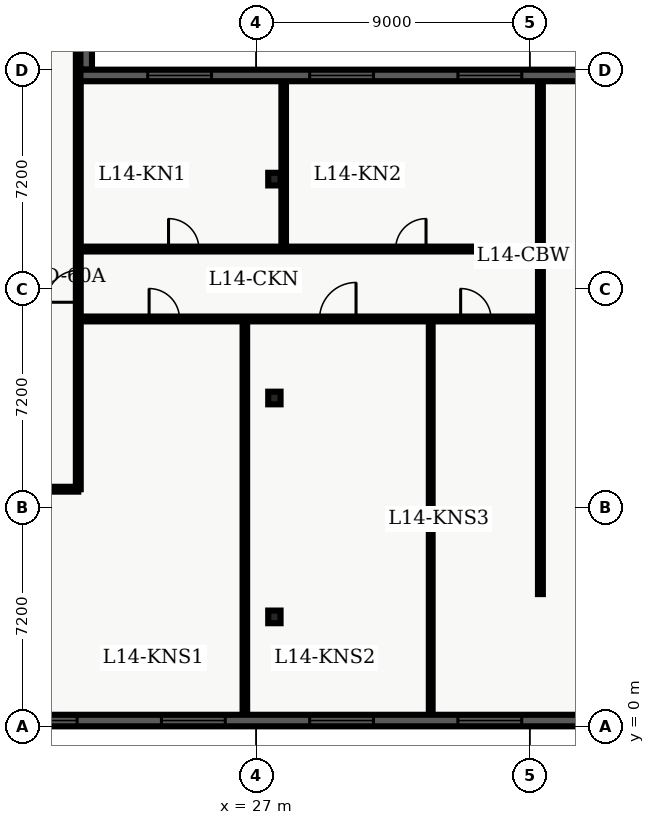
"""IFC4 building model, lengths in metres.
Left out: names, types, materials, properties, quantities, classifications, styles, units other than length and angle.
Written with IfcOpenShell. Run it as: python <this file> out.ifc"""

import sys

from ifc_helpers import new_model, entity, si_unit, converted_unit, direction, frame, origin_with_axes, origin_2d_with_axis, place, context, subcontext, project, spatial, polyline, rectangle, i_section, outline, extrude, element, fill, save


model = new_model("IFC4")
c1 = context("Model", 3, precision=1e-05, world=origin_with_axes(), true_north=direction((0.0, 1.0)))
c2 = subcontext(c1, "Body", "Model", "MODEL_VIEW")
j1 = project(units=[si_unit("LENGTHUNIT", "METRE"), converted_unit("PLANEANGLEUNIT", "DEGREE", entity("IfcPlaneAngleMeasure", 0.017), si_unit("PLANEANGLEUNIT", "RADIAN"), dimensions=[0, 0, 0, 0, 0, 0, 0])], contexts=[c1])
p1 = place(None, origin_with_axes())
s1 = spatial("IfcSite", under=j1, at=p1, CompositionType="ELEMENT")
p2 = place(p1, origin_with_axes())
s2 = spatial("IfcBuilding", under=s1, at=p2, CompositionType="ELEMENT")
p3 = place(p2, frame((0.0, 0.0, 60.0), z_axis=(0.0, 0.0, 1.0), x_axis=(1.0, 0.0, 0.0)))
s3 = spatial("IfcBuildingStorey", under=s2, at=p3, CompositionType="ELEMENT", Elevation=60.0)
for number, where, z_axis, x_axis in (
    (1, (27.6, 3.6, 0.0), (0.0, 0.0, 1.0), (1.0, 0.0, 0.0)),
    (2, (27.6, 10.8, 0.0), (0.0, 0.0, 1.0), (1.0, 0.0, 0.0)),
    (3, (27.6, 18.0, 0.0), (0.0, 0.0, 1.0), (1.0, 0.0, 0.0)),
):
    element("IfcColumn", number, at=place(p3, frame(where, z_axis=z_axis, x_axis=x_axis)), inside=s3, PredefinedType="COLUMN", context=c2, shape_type="SweptSolid", body=[
        extrude(i_section(OverallWidth=0.406, OverallDepth=0.416, WebThickness=0.03, FlangeThickness=0.048, FilletRadius=0.022, at=origin_2d_with_axis()), origin_with_axes(), (0.0, 0.0, 1.0), 3.9),
    ])
p4 = place(p3, frame((2.6, 7.8, 0.0), z_axis=(0.0, 0.0, 1.0), x_axis=(1.0, 0.0, 0.0)))
e4 = element("IfcWall", 4, at=p4, inside=s3, PredefinedType="PARTITIONING", context=c2, shape_type="SweptSolid", body=[
    extrude(outline(polyline([(0.0, -0.08), (18.55, -0.08), (18.55, 0.08), (0.0, 0.08), (0.0, -0.08)])), origin_with_axes(), (0.0, 0.0, 1.0), 2.7),
])
p5 = place(p4, frame((6.426, 0.0, 0.0), z_axis=(0.0, 0.0, 1.0), x_axis=(1.0, 0.0, 0.0)))
e5 = element("IfcOpeningElement", 5, at=p5, cuts=e4, PredefinedType="OPENING", context=c2, shape_type="SweptSolid", body=[
    extrude(rectangle(XDim=1.2, YDim=0.18, at=origin_2d_with_axis()), origin_with_axes(), (0.0, 0.0, 1.0), 2.2),
])
p6 = place(p4, frame((15.681, 0.0, 0.0), z_axis=(0.0, 0.0, 1.0), x_axis=(1.0, 0.0, 0.0)))
e6 = element("IfcOpeningElement", 6, at=p6, cuts=e4, PredefinedType="OPENING", context=c2, shape_type="SweptSolid", body=[
    extrude(rectangle(XDim=1.0, YDim=0.18, at=origin_2d_with_axis()), origin_with_axes(), (0.0, 0.0, 1.0), 2.15),
])
p7 = place(p3, frame((21.15, 7.8, 0.0), z_axis=(0.0, 0.0, 1.0), x_axis=(0.0, 1.0, 0.0)))
e7 = element("IfcWall", 7, at=p7, inside=s3, PredefinedType="PARTITIONING", context=c2, shape_type="SweptSolid", body=[
    extrude(outline(polyline([(0.0, -0.08), (32.7, -0.08), (32.7, 0.08), (0.0, 0.08), (0.0, -0.08)])), origin_with_axes(), (0.0, 0.0, 1.0), 2.7),
])
p8 = place(p7, frame((6.675, 0.0, 0.0), z_axis=(0.0, 0.0, 1.0), x_axis=(1.0, 0.0, 0.0)))
e8 = element("IfcOpeningElement", 8, at=p8, cuts=e7, PredefinedType="OPENING", context=c2, shape_type="SweptSolid", body=[
    extrude(rectangle(XDim=1.05, YDim=0.18, at=origin_2d_with_axis()), origin_with_axes(), (0.0, 0.0, 1.0), 2.15),
])
p9 = place(p3, frame((21.15, 13.4, 0.0), z_axis=(0.0, 0.0, 1.0), x_axis=(1.0, 0.0, 0.0)))
e9 = element("IfcWall", 9, at=p9, inside=s3, PredefinedType="PARTITIONING", context=c2, shape_type="SweptSolid", body=[
    extrude(outline(polyline([(0.0, -0.08), (15.2, -0.08), (15.2, 0.08), (0.0, 0.08), (0.0, -0.08)])), origin_with_axes(), (0.0, 0.0, 1.0), 2.7),
])
p10 = place(p9, frame((2.829, 0.0, 0.0), z_axis=(0.0, 0.0, 1.0), x_axis=(1.0, 0.0, 0.0)))
e10 = element("IfcOpeningElement", 10, at=p10, cuts=e9, PredefinedType="OPENING", context=c2, shape_type="SweptSolid", body=[
    extrude(rectangle(XDim=1.0, YDim=0.18, at=origin_2d_with_axis()), origin_with_axes(), (0.0, 0.0, 1.0), 2.15),
])
p11 = place(p9, frame((8.536, 0.0, 0.0), z_axis=(0.0, 0.0, 1.0), x_axis=(1.0, 0.0, 0.0)))
e11 = element("IfcOpeningElement", 11, at=p11, cuts=e9, PredefinedType="OPENING", context=c2, shape_type="SweptSolid", body=[
    extrude(rectangle(XDim=1.2, YDim=0.18, at=origin_2d_with_axis()), origin_with_axes(), (0.0, 0.0, 1.0), 2.2),
])
p12 = place(p9, frame((13.076, 0.0, 0.0), z_axis=(0.0, 0.0, 1.0), x_axis=(1.0, 0.0, 0.0)))
e12 = element("IfcOpeningElement", 12, at=p12, cuts=e9, PredefinedType="OPENING", context=c2, shape_type="SweptSolid", body=[
    extrude(rectangle(XDim=1.0, YDim=0.18, at=origin_2d_with_axis()), origin_with_axes(), (0.0, 0.0, 1.0), 2.15),
])
p13 = place(p3, frame((21.15, 15.7, 0.0), z_axis=(0.0, 0.0, 1.0), x_axis=(1.0, 0.0, 0.0)))
e13 = element("IfcWall", 13, at=p13, inside=s3, PredefinedType="PARTITIONING", context=c2, shape_type="SweptSolid", body=[
    extrude(outline(polyline([(0.0, -0.08), (15.2, -0.08), (15.2, 0.08), (0.0, 0.08), (0.0, -0.08)])), origin_with_axes(), (0.0, 0.0, 1.0), 2.7),
])
p14 = place(p13, frame((3.468, 0.0, 0.0), z_axis=(0.0, 0.0, 1.0), x_axis=(1.0, 0.0, 0.0)))
e14 = element("IfcOpeningElement", 14, at=p14, cuts=e13, PredefinedType="OPENING", context=c2, shape_type="SweptSolid", body=[
    extrude(rectangle(XDim=1.0, YDim=0.18, at=origin_2d_with_axis()), origin_with_axes(), (0.0, 0.0, 1.0), 2.15),
])
p15 = place(p13, frame((10.938, 0.0, 0.0), z_axis=(0.0, 0.0, 1.0), x_axis=(1.0, 0.0, 0.0)))
e15 = element("IfcOpeningElement", 15, at=p15, cuts=e13, PredefinedType="OPENING", context=c2, shape_type="SweptSolid", body=[
    extrude(rectangle(XDim=1.0, YDim=0.18, at=origin_2d_with_axis()), origin_with_axes(), (0.0, 0.0, 1.0), 2.15),
])
p16 = place(p3, frame((36.35, 4.35, 0.0), z_axis=(0.0, 0.0, 1.0), x_axis=(0.0, 1.0, 0.0)))
e16 = element("IfcWall", 16, at=p16, inside=s3, PredefinedType="PARTITIONING", context=c2, shape_type="SweptSolid", body=[
    extrude(outline(polyline([(0.0, -0.08), (16.95, -0.08), (16.95, 0.08), (0.0, 0.08), (0.0, -0.08)])), origin_with_axes(), (0.0, 0.0, 1.0), 2.7),
])
p17 = place(p3, frame((26.629, 0.36, 0.0), z_axis=(0.0, 0.0, 1.0), x_axis=(0.0, 1.0, 0.0)))
e17 = element("IfcWall", 17, at=p17, inside=s3, PredefinedType="PARTITIONING", context=c2, shape_type="SweptSolid", body=[
    extrude(outline(polyline([(0.0, -0.075), (12.92, -0.075), (12.92, 0.075), (0.0, 0.075), (0.0, -0.075)])), origin_with_axes(), (0.0, 0.0, 1.0), 2.7),
])
p18 = place(p3, frame((32.742, 0.36, 0.0), z_axis=(0.0, 0.0, 1.0), x_axis=(0.0, 1.0, 0.0)))
e18 = element("IfcWall", 18, at=p18, inside=s3, PredefinedType="PARTITIONING", context=c2, shape_type="SweptSolid", body=[
    extrude(outline(polyline([(0.0, -0.062), (12.92, -0.062), (12.92, 0.062), (0.0, 0.062), (0.0, -0.062)])), origin_with_axes(), (0.0, 0.0, 1.0), 2.7),
])
p19 = place(p3, frame((27.906, 15.82, 0.0), z_axis=(0.0, 0.0, 1.0), x_axis=(0.0, 1.0, 0.0)))
e19 = element("IfcWall", 19, at=p19, inside=s3, PredefinedType="PARTITIONING", context=c2, shape_type="SweptSolid", body=[
    extrude(outline(polyline([(0.0, -0.075), (5.405, -0.075), (5.405, 0.075), (0.0, 0.075), (0.0, -0.075)])), origin_with_axes(), (0.0, 0.0, 1.0), 2.7),
])
p20 = place(p3, frame((57.22, 0.19, 0.0), z_axis=(0.0, 0.0, 1.0), x_axis=(-1.0, 0.0, 0.0)))
e20 = element("IfcWall", 20, at=p20, inside=s3, PredefinedType="SOLIDWALL", context=c2, shape_type="SweptSolid", body=[
    extrude(outline(polyline([(0.0, -0.19), (54.82, -0.19), (54.82, 0.19), (0.0, 0.19), (0.0, -0.19)])), origin_with_axes(), (0.0, 0.0, 1.0), 3.66),
])
p21 = place(p20, frame((3.037, 0.0, 0.45), z_axis=(0.0, 0.0, 1.0), x_axis=(1.0, 0.0, 0.0)))
e21 = element("IfcOpeningElement", 21, at=p21, cuts=e20, PredefinedType="OPENING", context=c2, shape_type="SweptSolid", body=[
    extrude(rectangle(XDim=2.1, YDim=0.4, at=origin_2d_with_axis()), origin_with_axes(), (0.0, 0.0, 1.0), 2.2),
])
p22 = place(p20, frame((7.912, 0.0, 0.45), z_axis=(0.0, 0.0, 1.0), x_axis=(1.0, 0.0, 0.0)))
e22 = element("IfcOpeningElement", 22, at=p22, cuts=e20, PredefinedType="OPENING", context=c2, shape_type="SweptSolid", body=[
    extrude(rectangle(XDim=2.1, YDim=0.4, at=origin_2d_with_axis()), origin_with_axes(), (0.0, 0.0, 1.0), 2.2),
])
p23 = place(p20, frame((12.786, 0.0, 0.45), z_axis=(0.0, 0.0, 1.0), x_axis=(1.0, 0.0, 0.0)))
e23 = element("IfcOpeningElement", 23, at=p23, cuts=e20, PredefinedType="OPENING", context=c2, shape_type="SweptSolid", body=[
    extrude(rectangle(XDim=2.1, YDim=0.4, at=origin_2d_with_axis()), origin_with_axes(), (0.0, 0.0, 1.0), 2.2),
])
p24 = place(p20, frame((17.661, 0.0, 0.45), z_axis=(0.0, 0.0, 1.0), x_axis=(1.0, 0.0, 0.0)))
e24 = element("IfcOpeningElement", 24, at=p24, cuts=e20, PredefinedType="OPENING", context=c2, shape_type="SweptSolid", body=[
    extrude(rectangle(XDim=2.1, YDim=0.4, at=origin_2d_with_axis()), origin_with_axes(), (0.0, 0.0, 1.0), 2.2),
])
p25 = place(p20, frame((22.535, 0.0, 0.45), z_axis=(0.0, 0.0, 1.0), x_axis=(1.0, 0.0, 0.0)))
e25 = element("IfcOpeningElement", 25, at=p25, cuts=e20, PredefinedType="OPENING", context=c2, shape_type="SweptSolid", body=[
    extrude(rectangle(XDim=2.1, YDim=0.4, at=origin_2d_with_axis()), origin_with_axes(), (0.0, 0.0, 1.0), 2.2),
])
p26 = place(p20, frame((27.41, 0.0, 0.45), z_axis=(0.0, 0.0, 1.0), x_axis=(1.0, 0.0, 0.0)))
e26 = element("IfcOpeningElement", 26, at=p26, cuts=e20, PredefinedType="OPENING", context=c2, shape_type="SweptSolid", body=[
    extrude(rectangle(XDim=2.1, YDim=0.4, at=origin_2d_with_axis()), origin_with_axes(), (0.0, 0.0, 1.0), 2.2),
])
p27 = place(p20, frame((32.285, 0.0, 0.45), z_axis=(0.0, 0.0, 1.0), x_axis=(1.0, 0.0, 0.0)))
e27 = element("IfcOpeningElement", 27, at=p27, cuts=e20, PredefinedType="OPENING", context=c2, shape_type="SweptSolid", body=[
    extrude(rectangle(XDim=2.1, YDim=0.4, at=origin_2d_with_axis()), origin_with_axes(), (0.0, 0.0, 1.0), 2.2),
])
p28 = place(p20, frame((37.159, 0.0, 0.45), z_axis=(0.0, 0.0, 1.0), x_axis=(1.0, 0.0, 0.0)))
e28 = element("IfcOpeningElement", 28, at=p28, cuts=e20, PredefinedType="OPENING", context=c2, shape_type="SweptSolid", body=[
    extrude(rectangle(XDim=2.1, YDim=0.4, at=origin_2d_with_axis()), origin_with_axes(), (0.0, 0.0, 1.0), 2.2),
])
p29 = place(p20, frame((46.908, 0.0, 0.45), z_axis=(0.0, 0.0, 1.0), x_axis=(1.0, 0.0, 0.0)))
e29 = element("IfcOpeningElement", 29, at=p29, cuts=e20, PredefinedType="OPENING", context=c2, shape_type="SweptSolid", body=[
    extrude(rectangle(XDim=2.1, YDim=0.4, at=origin_2d_with_axis()), origin_with_axes(), (0.0, 0.0, 1.0), 2.2),
])
p30 = place(p20, frame((51.783, 0.0, 0.45), z_axis=(0.0, 0.0, 1.0), x_axis=(1.0, 0.0, 0.0)))
e30 = element("IfcOpeningElement", 30, at=p30, cuts=e20, PredefinedType="OPENING", context=c2, shape_type="SweptSolid", body=[
    extrude(rectangle(XDim=2.1, YDim=0.4, at=origin_2d_with_axis()), origin_with_axes(), (0.0, 0.0, 1.0), 2.2),
])
p31 = place(p3, frame((21.41, 45.82, 0.0), z_axis=(0.0, 0.0, 1.0), x_axis=(0.0, -1.0, 0.0)))
e31 = element("IfcWall", 31, at=p31, inside=s3, PredefinedType="SOLIDWALL", context=c2, shape_type="SweptSolid", body=[
    extrude(outline(polyline([(0.0, -0.19), (24.22, -0.19), (24.22, 0.19), (0.0, 0.19), (0.0, -0.19)])), origin_with_axes(), (0.0, 0.0, 1.0), 3.66),
])
p32 = place(p31, frame((2.902, 0.0, 0.45), z_axis=(0.0, 0.0, 1.0), x_axis=(1.0, 0.0, 0.0)))
e32 = element("IfcOpeningElement", 32, at=p32, cuts=e31, PredefinedType="OPENING", context=c2, shape_type="SweptSolid", body=[
    extrude(rectangle(XDim=2.1, YDim=0.4, at=origin_2d_with_axis()), origin_with_axes(), (0.0, 0.0, 1.0), 2.2),
])
p33 = place(p3, frame((21.22, 21.41, 0.0), z_axis=(0.0, 0.0, 1.0), x_axis=(1.0, 0.0, 0.0)))
e33 = element("IfcWall", 33, at=p33, inside=s3, PredefinedType="SOLIDWALL", context=c2, shape_type="SweptSolid", body=[
    extrude(outline(polyline([(0.0, -0.19), (17.18, -0.19), (17.18, 0.19), (0.0, 0.19), (0.0, -0.19)])), origin_with_axes(), (0.0, 0.0, 1.0), 3.66),
])
p34 = place(p33, frame((3.263, 0.0, 0.45), z_axis=(0.0, 0.0, 1.0), x_axis=(1.0, 0.0, 0.0)))
e34 = element("IfcOpeningElement", 34, at=p34, cuts=e33, PredefinedType="OPENING", context=c2, shape_type="SweptSolid", body=[
    extrude(rectangle(XDim=2.1, YDim=0.4, at=origin_2d_with_axis()), origin_with_axes(), (0.0, 0.0, 1.0), 2.2),
])
p35 = place(p33, frame((8.59, 0.0, 0.45), z_axis=(0.0, 0.0, 1.0), x_axis=(1.0, 0.0, 0.0)))
e35 = element("IfcOpeningElement", 35, at=p35, cuts=e33, PredefinedType="OPENING", context=c2, shape_type="SweptSolid", body=[
    extrude(rectangle(XDim=2.1, YDim=0.4, at=origin_2d_with_axis()), origin_with_axes(), (0.0, 0.0, 1.0), 2.2),
])
p36 = place(p33, frame((13.467, 0.0, 0.45), z_axis=(0.0, 0.0, 1.0), x_axis=(1.0, 0.0, 0.0)))
e36 = element("IfcOpeningElement", 36, at=p36, cuts=e33, PredefinedType="OPENING", context=c2, shape_type="SweptSolid", body=[
    extrude(rectangle(XDim=2.1, YDim=0.4, at=origin_2d_with_axis()), origin_with_axes(), (0.0, 0.0, 1.0), 2.2),
])
p37 = place(p7, frame((6.675, 0.0, 0.0), z_axis=(0.0, 0.0, 1.0), x_axis=(1.0, 0.0, 0.0)))
e37 = element("IfcDoor", 37, at=p37, inside=s3, OperationType="SINGLE_SWING_LEFT", PredefinedType="DOOR", context=c2, shape_type="SweptSolid", body=[
    extrude(rectangle(XDim=1.05, YDim=0.09, at=origin_2d_with_axis()), origin_with_axes(), (0.0, 0.0, 1.0), 2.15),
])
fill(e8, e37)
p38 = place(p9, frame((2.829, 0.0, 0.0), z_axis=(0.0, 0.0, 1.0), x_axis=(1.0, 0.0, 0.0)))
e38 = element("IfcDoor", 38, at=p38, inside=s3, OperationType="SINGLE_SWING_LEFT", PredefinedType="DOOR", context=c2, shape_type="SweptSolid", body=[
    extrude(rectangle(XDim=1.0, YDim=0.09, at=origin_2d_with_axis()), origin_with_axes(), (0.0, 0.0, 1.0), 2.15),
])
fill(e10, e38)
p39 = place(p9, frame((8.536, 0.0, 0.0), z_axis=(0.0, 0.0, 1.0), x_axis=(1.0, 0.0, 0.0)))
e39 = element("IfcDoor", 39, at=p39, inside=s3, OperationType="SINGLE_SWING_RIGHT", PredefinedType="DOOR", context=c2, shape_type="SweptSolid", body=[
    extrude(rectangle(XDim=1.2, YDim=0.09, at=origin_2d_with_axis()), origin_with_axes(), (0.0, 0.0, 1.0), 2.2),
])
fill(e11, e39)
p40 = place(p9, frame((13.076, 0.0, 0.0), z_axis=(0.0, 0.0, 1.0), x_axis=(1.0, 0.0, 0.0)))
e40 = element("IfcDoor", 40, at=p40, inside=s3, OperationType="SINGLE_SWING_LEFT", PredefinedType="DOOR", context=c2, shape_type="SweptSolid", body=[
    extrude(rectangle(XDim=1.0, YDim=0.09, at=origin_2d_with_axis()), origin_with_axes(), (0.0, 0.0, 1.0), 2.15),
])
fill(e12, e40)
p41 = place(p13, frame((3.468, 0.0, 0.0), z_axis=(0.0, 0.0, 1.0), x_axis=(1.0, 0.0, 0.0)))
e41 = element("IfcDoor", 41, at=p41, inside=s3, OperationType="SINGLE_SWING_LEFT", PredefinedType="DOOR", context=c2, shape_type="SweptSolid", body=[
    extrude(rectangle(XDim=1.0, YDim=0.09, at=origin_2d_with_axis()), origin_with_axes(), (0.0, 0.0, 1.0), 2.15),
])
fill(e14, e41)
p42 = place(p13, frame((10.938, 0.0, 0.0), z_axis=(0.0, 0.0, 1.0), x_axis=(1.0, 0.0, 0.0)))
e42 = element("IfcDoor", 42, at=p42, inside=s3, OperationType="SINGLE_SWING_RIGHT", PredefinedType="DOOR", context=c2, shape_type="SweptSolid", body=[
    extrude(rectangle(XDim=1.0, YDim=0.09, at=origin_2d_with_axis()), origin_with_axes(), (0.0, 0.0, 1.0), 2.15),
])
fill(e15, e42)
p43 = place(p20, frame((22.535, 0.0, 0.45), z_axis=(0.0, 0.0, 1.0), x_axis=(1.0, 0.0, 0.0)))
e43 = element("IfcWindow", 43, at=p43, inside=s3, PredefinedType="WINDOW", context=c2, shape_type="SweptSolid", body=[
    extrude(rectangle(XDim=2.1, YDim=0.09, at=origin_2d_with_axis()), origin_with_axes(), (0.0, 0.0, 1.0), 2.2),
])
fill(e25, e43)
p44 = place(p20, frame((27.41, 0.0, 0.45), z_axis=(0.0, 0.0, 1.0), x_axis=(1.0, 0.0, 0.0)))
e44 = element("IfcWindow", 44, at=p44, inside=s3, PredefinedType="WINDOW", context=c2, shape_type="SweptSolid", body=[
    extrude(rectangle(XDim=2.1, YDim=0.09, at=origin_2d_with_axis()), origin_with_axes(), (0.0, 0.0, 1.0), 2.2),
])
fill(e26, e44)
p45 = place(p20, frame((32.285, 0.0, 0.45), z_axis=(0.0, 0.0, 1.0), x_axis=(1.0, 0.0, 0.0)))
e45 = element("IfcWindow", 45, at=p45, inside=s3, PredefinedType="WINDOW", context=c2, shape_type="SweptSolid", body=[
    extrude(rectangle(XDim=2.1, YDim=0.09, at=origin_2d_with_axis()), origin_with_axes(), (0.0, 0.0, 1.0), 2.2),
])
fill(e27, e45)
p46 = place(p20, frame((37.159, 0.0, 0.45), z_axis=(0.0, 0.0, 1.0), x_axis=(1.0, 0.0, 0.0)))
e46 = element("IfcWindow", 46, at=p46, inside=s3, PredefinedType="WINDOW", context=c2, shape_type="SweptSolid", body=[
    extrude(rectangle(XDim=2.1, YDim=0.09, at=origin_2d_with_axis()), origin_with_axes(), (0.0, 0.0, 1.0), 2.2),
])
fill(e28, e46)
p47 = place(p33, frame((3.263, 0.0, 0.45), z_axis=(0.0, 0.0, 1.0), x_axis=(1.0, 0.0, 0.0)))
e47 = element("IfcWindow", 47, at=p47, inside=s3, PredefinedType="WINDOW", context=c2, shape_type="SweptSolid", body=[
    extrude(rectangle(XDim=2.1, YDim=0.09, at=origin_2d_with_axis()), origin_with_axes(), (0.0, 0.0, 1.0), 2.2),
])
fill(e34, e47)
p48 = place(p33, frame((8.59, 0.0, 0.45), z_axis=(0.0, 0.0, 1.0), x_axis=(1.0, 0.0, 0.0)))
e48 = element("IfcWindow", 48, at=p48, inside=s3, PredefinedType="WINDOW", context=c2, shape_type="SweptSolid", body=[
    extrude(rectangle(XDim=2.1, YDim=0.09, at=origin_2d_with_axis()), origin_with_axes(), (0.0, 0.0, 1.0), 2.2),
])
fill(e35, e48)
p49 = place(p33, frame((13.467, 0.0, 0.45), z_axis=(0.0, 0.0, 1.0), x_axis=(1.0, 0.0, 0.0)))
e49 = element("IfcWindow", 49, at=p49, inside=s3, PredefinedType="WINDOW", context=c2, shape_type="SweptSolid", body=[
    extrude(rectangle(XDim=2.1, YDim=0.09, at=origin_2d_with_axis()), origin_with_axes(), (0.0, 0.0, 1.0), 2.2),
])
fill(e36, e49)
save(model, sys.argv[1])
